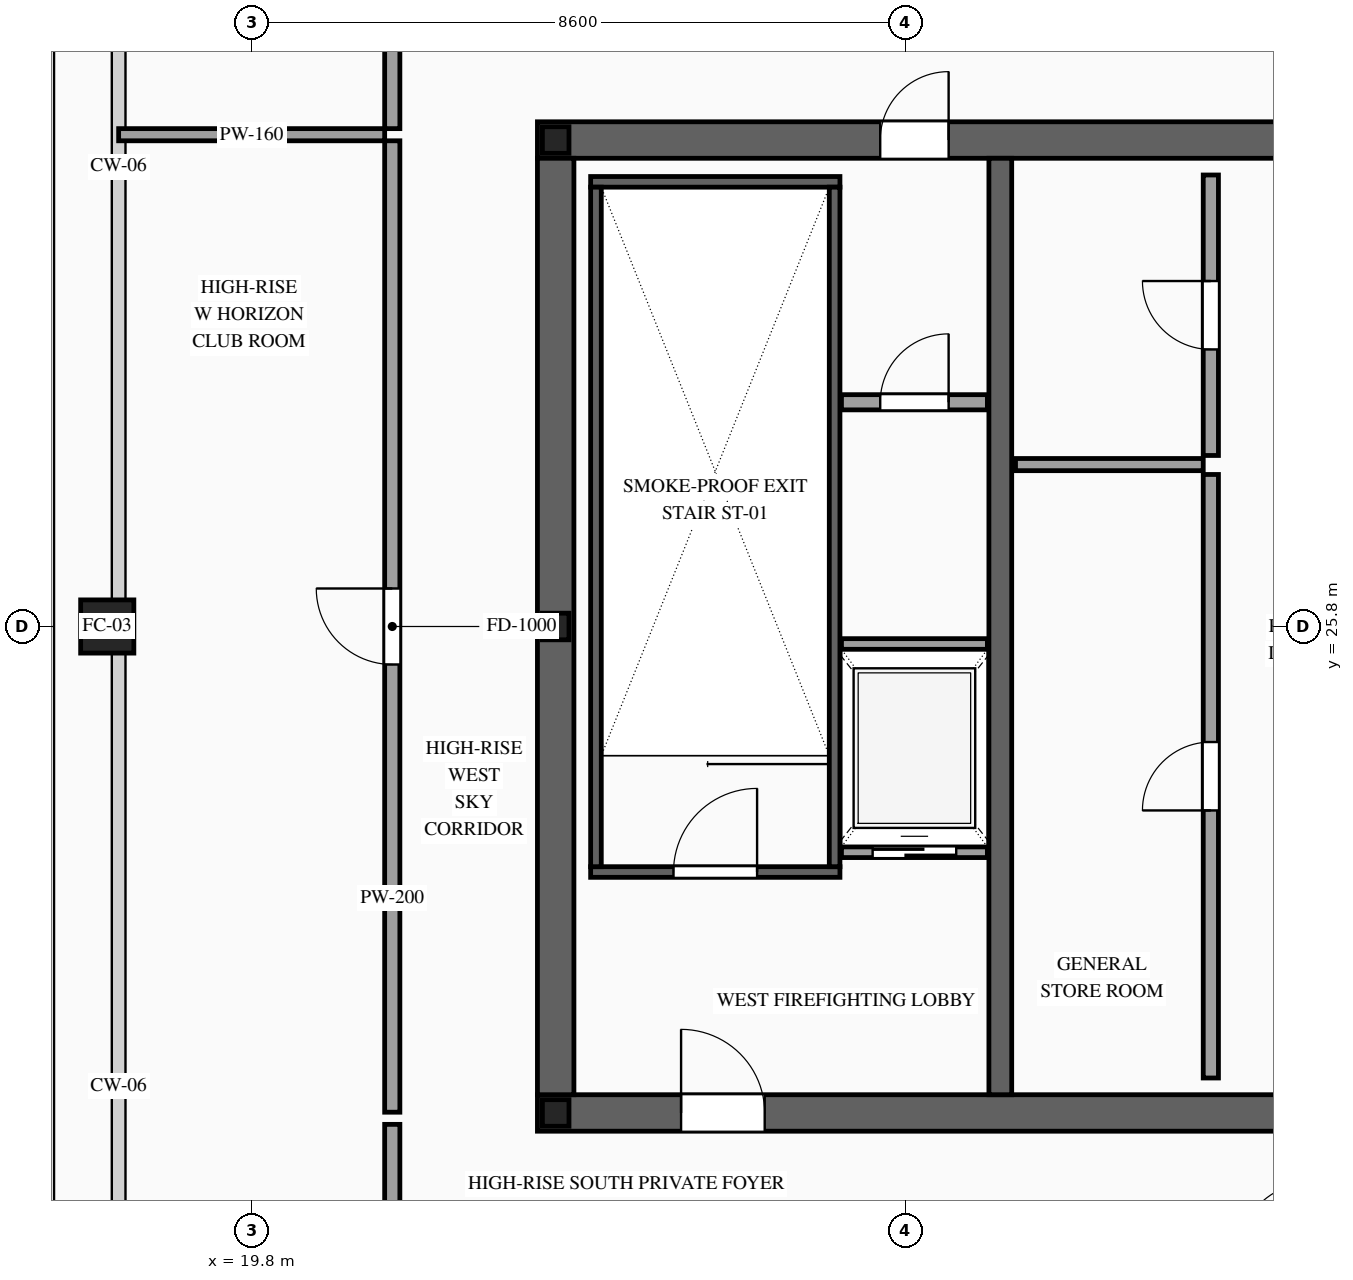
"""IFC4 building model, lengths in metres.
Left out: names, types, materials, properties, quantities, classifications, styles, units other than length and angle.
Written with IfcOpenShell. Run it as: python <this file> out.ifc"""

import sys

from ifc_helpers import new_model, si_unit, direction, frame, frame_2d, origin, origin_2d, place, context, subcontext, project, spatial, rectangle, hollow_rectangle, i_section, extrude, source, transform, mapped, element, fill, save


model = new_model("IFC4")
c1 = context("Model", 3, precision=1e-05, world=origin(), true_north=direction((0.0, 1.0)))
c2 = subcontext(c1, "Body", "Model", "MODEL_VIEW")
j1 = project(units=[si_unit("LENGTHUNIT", "METRE"), si_unit("PLANEANGLEUNIT", "RADIAN")], contexts=[c1])
p1 = place(None, origin())
s1 = spatial("IfcSite", under=j1, at=p1, CompositionType="ELEMENT")
p2 = place(p1, origin())
s2 = spatial("IfcBuilding", under=s1, at=p2, CompositionType="ELEMENT")
p3 = place(p2, frame((0.0, 0.0, 347.2)))
s3 = spatial("IfcBuildingStorey", under=s2, at=p3, CompositionType="ELEMENT", Elevation=347.2)
p4 = place(p3, frame((23.56, 19.4, 0.0), z_axis=(0.0, 0.0, 1.0), x_axis=(1.0, 0.0, 0.0)))
e1 = element("IfcWall", 1, at=p4, inside=s3, PredefinedType="SHEAR", context=c2, shape_type="SweptSolid", body=[
    extrude(rectangle(XDim=26.88, YDim=0.48, at=frame_2d((13.44, 0.0))), origin(), (0.0, 0.0, 1.0), 4.0),
])
p5 = place(p4, frame((1.89, 0.0, 0.0)))
e2 = element("IfcOpeningElement", 2, at=p5, cuts=e1, PredefinedType="OPENING", context=c2, shape_type="SweptSolid", body=[
    extrude(rectangle(XDim=1.1, YDim=2.2, at=frame_2d((0.55, 1.1))), frame((0.0, 0.255, 0.0), z_axis=(0.0, -1.0, 0.0), x_axis=(1.0, 0.0, 0.0)), (0.0, 0.0, 1.0), 0.51),
])
p6 = place(p4, frame((9.79, 0.0, 0.0)))
e3 = element("IfcOpeningElement", 3, at=p6, cuts=e1, PredefinedType="OPENING", context=c2, shape_type="SweptSolid", body=[
    extrude(rectangle(XDim=1.1, YDim=2.2, at=frame_2d((0.55, 1.1))), frame((0.0, 0.255, 0.0), z_axis=(0.0, -1.0, 0.0), x_axis=(1.0, 0.0, 0.0)), (0.0, 0.0, 1.0), 0.51),
])
p7 = place(p4, frame((22.99, 0.0, 0.0)))
e4 = element("IfcOpeningElement", 4, at=p7, cuts=e1, PredefinedType="OPENING", context=c2, shape_type="SweptSolid", body=[
    extrude(rectangle(XDim=1.1, YDim=2.2, at=frame_2d((0.55, 1.1))), frame((0.0, 0.255, 0.0), z_axis=(0.0, -1.0, 0.0), x_axis=(1.0, 0.0, 0.0)), (0.0, 0.0, 1.0), 0.51),
])
p8 = place(p4, frame((19.61, 0.0, 0.0)))
e5 = element("IfcOpeningElement", 5, at=p8, cuts=e1, PredefinedType="OPENING", context=c2, shape_type="SweptSolid", body=[
    extrude(rectangle(XDim=0.9, YDim=2.15, at=frame_2d((0.45, 1.075))), frame((0.0, 0.255, 0.0), z_axis=(0.0, -1.0, 0.0), x_axis=(1.0, 0.0, 0.0)), (0.0, 0.0, 1.0), 0.51),
])
p9 = place(p4, frame((18.17, 0.0, 0.0)))
e6 = element("IfcOpeningElement", 6, at=p9, cuts=e1, PredefinedType="OPENING", context=c2, shape_type="SweptSolid", body=[
    extrude(rectangle(XDim=0.9, YDim=2.15, at=frame_2d((0.45, 1.075))), frame((0.0, 0.255, 0.0), z_axis=(0.0, -1.0, 0.0), x_axis=(1.0, 0.0, 0.0)), (0.0, 0.0, 1.0), 0.51),
])
p10 = place(p3, frame((23.56, 32.2, 0.0), z_axis=(0.0, 0.0, 1.0), x_axis=(1.0, 0.0, 0.0)))
e7 = element("IfcWall", 7, at=p10, inside=s3, PredefinedType="SHEAR", context=c2, shape_type="SweptSolid", body=[
    extrude(rectangle(XDim=26.88, YDim=0.48, at=frame_2d((13.44, 0.0))), origin(), (0.0, 0.0, 1.0), 4.0),
])
p11 = place(p10, frame((4.51, 0.0, 0.0)))
e8 = element("IfcOpeningElement", 8, at=p11, cuts=e7, PredefinedType="OPENING", context=c2, shape_type="SweptSolid", body=[
    extrude(rectangle(XDim=0.9, YDim=2.15, at=frame_2d((0.45, 1.075))), frame((0.0, 0.255, 0.0), z_axis=(0.0, -1.0, 0.0), x_axis=(1.0, 0.0, 0.0)), (0.0, 0.0, 1.0), 0.51),
])
p12 = place(p10, frame((9.79, 0.0, 0.0)))
e9 = element("IfcOpeningElement", 9, at=p12, cuts=e7, PredefinedType="OPENING", context=c2, shape_type="SweptSolid", body=[
    extrude(rectangle(XDim=1.1, YDim=2.2, at=frame_2d((0.55, 1.1))), frame((0.0, 0.255, 0.0), z_axis=(0.0, -1.0, 0.0), x_axis=(1.0, 0.0, 0.0)), (0.0, 0.0, 1.0), 0.51),
])
p13 = place(p10, frame((15.64, 0.0, 0.0)))
e10 = element("IfcOpeningElement", 10, at=p13, cuts=e7, PredefinedType="OPENING", context=c2, shape_type="SweptSolid", body=[
    extrude(rectangle(XDim=1.1, YDim=2.2, at=frame_2d((0.55, 1.1))), frame((0.0, 0.255, 0.0), z_axis=(0.0, -1.0, 0.0), x_axis=(1.0, 0.0, 0.0)), (0.0, 0.0, 1.0), 0.51),
])
p14 = place(p10, frame((18.74, 0.0, 0.0)))
e11 = element("IfcOpeningElement", 11, at=p14, cuts=e7, PredefinedType="OPENING", context=c2, shape_type="SweptSolid", body=[
    extrude(rectangle(XDim=1.1, YDim=2.2, at=frame_2d((0.55, 1.1))), frame((0.0, 0.255, 0.0), z_axis=(0.0, -1.0, 0.0), x_axis=(1.0, 0.0, 0.0)), (0.0, 0.0, 1.0), 0.51),
])
m1 = source(origin(), c2, "Body", "SweptSolid", [
    extrude(rectangle(XDim=12.32, YDim=0.48, at=frame_2d((6.16, 0.0))), origin(), (0.0, 0.0, 1.0), 4.0),
])
p15 = place(p3, frame((23.8, 19.64, 0.0), z_axis=(0.0, 0.0, 1.0), x_axis=(0.0, 1.0, 0.0)))
e12 = element("IfcWall", 12, at=p15, inside=s3, PredefinedType="SHEAR", context=c2, shape_type="MappedRepresentation", body=[
    mapped(m1, transform((0.0, 0.0, 0.0), scale=1.0)),
])
m2 = source(origin(), c2, "Body", "SweptSolid", [
    extrude(rectangle(XDim=12.32, YDim=0.3, at=frame_2d((6.16, 0.0))), origin(), (0.0, 0.0, 1.0), 4.0),
])
p16 = place(p3, frame((29.65, 19.64, 0.0), z_axis=(0.0, 0.0, 1.0), x_axis=(0.0, 1.0, 0.0)))
e13 = element("IfcWall", 13, at=p16, inside=s3, PredefinedType="SOLIDWALL", context=c2, shape_type="MappedRepresentation", body=[
    mapped(m2, transform((0.0, 0.0, 0.0), scale=1.0)),
])
m3 = source(origin(), c2, "Body", "SweptSolid", [
    extrude(i_section(OverallWidth=0.35, OverallDepth=0.35, WebThickness=0.012, FlangeThickness=0.019, at=origin_2d()), origin(), (0.0, 0.0, 1.0), 4.0),
])
for number, where, z_axis, x_axis in (
    (14, (23.8, 19.4, 0.0), (0.0, 0.0, 1.0), (1.0, 0.0, 0.0)),
    (15, (23.8, 25.8, 0.0), (0.0, 0.0, 1.0), (1.0, 0.0, 0.0)),
    (16, (23.8, 32.2, 0.0), (0.0, 0.0, 1.0), (1.0, 0.0, 0.0)),
):
    element("IfcColumn", number, at=place(p3, frame(where, z_axis=z_axis, x_axis=x_axis)), inside=s3, PredefinedType="COLUMN", context=c2, shape_type="MappedRepresentation", body=[
        mapped(m3, transform((0.0, 0.0, 0.0), scale=1.0)),
    ])
m4 = source(origin(), c2, "Body", "SweptSolid", [
    extrude(hollow_rectangle(XDim=0.7, YDim=0.7, WallThickness=0.032, at=origin_2d()), origin(), (0.0, 0.0, 1.0), 4.0),
])
p17 = place(p3, frame((17.9, 25.8, 0.0), z_axis=(0.0, 0.0, 1.0), x_axis=(1.0, 0.0, 0.0)))
e17 = element("IfcColumn", 17, at=p17, inside=s3, PredefinedType="COLUMN", context=c2, shape_type="MappedRepresentation", body=[
    mapped(m4, transform((0.0, 0.0, 0.0), scale=1.0)),
])
p18 = place(p3, frame((27.56, 22.83, 0.0), z_axis=(0.0, 0.0, 1.0), x_axis=(1.0, 0.0, 0.0)))
e18 = element("IfcWall", 18, at=p18, inside=s3, PredefinedType="SOLIDWALL", context=c2, shape_type="SweptSolid", body=[
    extrude(rectangle(XDim=1.92, YDim=0.14, at=frame_2d((0.96, 0.0))), origin(), (0.0, 0.0, 1.0), 3.7),
])
p19 = place(p18, frame((0.41, 0.0, 0.0)))
e19 = element("IfcOpeningElement", 19, at=p19, cuts=e18, PredefinedType="OPENING", context=c2, shape_type="SweptSolid", body=[
    extrude(rectangle(XDim=1.1, YDim=2.2, at=frame_2d((0.55, 1.1))), frame((0.0, 0.085, 0.0), z_axis=(0.0, -1.0, 0.0), x_axis=(1.0, 0.0, 0.0)), (0.0, 0.0, 1.0), 0.17),
])
m5 = source(origin(), c2, "Body", "SweptSolid", [
    extrude(rectangle(XDim=1.92, YDim=0.14, at=frame_2d((0.96, 0.0))), origin(), (0.0, 0.0, 1.0), 3.7),
])
p20 = place(p3, frame((27.56, 25.57, 0.0), z_axis=(0.0, 0.0, 1.0), x_axis=(1.0, 0.0, 0.0)))
e20 = element("IfcWall", 20, at=p20, inside=s3, PredefinedType="SOLIDWALL", context=c2, shape_type="MappedRepresentation", body=[
    mapped(m5, transform((0.0, 0.0, 0.0), scale=1.0)),
])
p21 = place(p3, frame((24.26, 22.57, 0.0), z_axis=(0.0, 0.0, 1.0), x_axis=(1.0, 0.0, 0.0)))
e21 = element("IfcWall", 21, at=p21, inside=s3, PredefinedType="SOLIDWALL", context=c2, shape_type="SweptSolid", body=[
    extrude(rectangle(XDim=3.28, YDim=0.14, at=frame_2d((1.64, 0.0))), origin(), (0.0, 0.0, 1.0), 3.7),
])
p22 = place(p21, frame((1.09, 0.0, 0.0)))
e22 = element("IfcOpeningElement", 22, at=p22, cuts=e21, PredefinedType="OPENING", context=c2, shape_type="SweptSolid", body=[
    extrude(rectangle(XDim=1.1, YDim=2.2, at=frame_2d((0.55, 1.1))), frame((0.0, 0.085, 0.0), z_axis=(0.0, -1.0, 0.0), x_axis=(1.0, 0.0, 0.0)), (0.0, 0.0, 1.0), 0.17),
])
m6 = source(origin(), c2, "Body", "SweptSolid", [
    extrude(rectangle(XDim=3.28, YDim=0.14, at=frame_2d((1.64, 0.0))), origin(), (0.0, 0.0, 1.0), 3.7),
])
p23 = place(p3, frame((24.26, 31.65, 0.0), z_axis=(0.0, 0.0, 1.0), x_axis=(1.0, 0.0, 0.0)))
e23 = element("IfcWall", 23, at=p23, inside=s3, PredefinedType="SOLIDWALL", context=c2, shape_type="MappedRepresentation", body=[
    mapped(m6, transform((0.0, 0.0, 0.0), scale=1.0)),
])
m7 = source(origin(), c2, "Body", "SweptSolid", [
    extrude(rectangle(XDim=8.94, YDim=0.14, at=frame_2d((4.47, 0.0))), origin(), (0.0, 0.0, 1.0), 3.7),
])
for number, where, z_axis, x_axis in (
    (24, (24.33, 22.64, 0.0), (0.0, 0.0, 1.0), (0.0, 1.0, 0.0)),
    (25, (27.47, 22.64, 0.0), (0.0, 0.0, 1.0), (0.0, 1.0, 0.0)),
):
    element("IfcWall", number, at=place(p3, frame(where, z_axis=z_axis, x_axis=x_axis)), inside=s3, PredefinedType="SOLIDWALL", context=c2, shape_type="MappedRepresentation", body=[
        mapped(m7, transform((0.0, 0.0, 0.0), scale=1.0)),
    ])
p24 = place(p3, frame((27.56, 28.75, 0.0), z_axis=(0.0, 0.0, 1.0), x_axis=(1.0, 0.0, 0.0)))
e26 = element("IfcWall", 26, at=p24, inside=s3, PredefinedType="PARTITIONING", context=c2, shape_type="SweptSolid", body=[
    extrude(rectangle(XDim=1.92, YDim=0.2, at=frame_2d((0.96, 0.0))), origin(), (0.0, 0.0, 1.0), 3.7),
])
p25 = place(p24, frame((0.51, 0.0, 0.0)))
e27 = element("IfcOpeningElement", 27, at=p25, cuts=e26, PredefinedType="OPENING", context=c2, shape_type="SweptSolid", body=[
    extrude(rectangle(XDim=0.9, YDim=2.15, at=frame_2d((0.45, 1.075))), frame((0.0, 0.115, 0.0), z_axis=(0.0, -1.0, 0.0), x_axis=(1.0, 0.0, 0.0)), (0.0, 0.0, 1.0), 0.23),
])
p26 = place(p3, frame((32.42, 19.86, 0.0), z_axis=(0.0, 0.0, 1.0), x_axis=(0.0, 1.0, 0.0)))
e28 = element("IfcWall", 28, at=p26, inside=s3, PredefinedType="PARTITIONING", context=c2, shape_type="SweptSolid", body=[
    extrude(rectangle(XDim=7.94, YDim=0.2, at=frame_2d((3.97, 0.0))), origin(), (0.0, 0.0, 1.0), 3.7),
])
p27 = place(p26, frame((3.52, 0.0, 0.0)))
e29 = element("IfcOpeningElement", 29, at=p27, cuts=e28, PredefinedType="OPENING", context=c2, shape_type="SweptSolid", body=[
    extrude(rectangle(XDim=0.9, YDim=2.15, at=frame_2d((0.45, 1.075))), frame((0.0, 0.115, 0.0), z_axis=(0.0, -1.0, 0.0), x_axis=(1.0, 0.0, 0.0)), (0.0, 0.0, 1.0), 0.23),
])
p28 = place(p3, frame((32.42, 28.05, 0.0), z_axis=(0.0, 0.0, 1.0), x_axis=(0.0, 1.0, 0.0)))
e30 = element("IfcWall", 30, at=p28, inside=s3, PredefinedType="PARTITIONING", context=c2, shape_type="SweptSolid", body=[
    extrude(rectangle(XDim=3.69, YDim=0.2, at=frame_2d((1.845, 0.0))), origin(), (0.0, 0.0, 1.0), 3.7),
])
p29 = place(p28, frame((1.395, 0.0, 0.0)))
e31 = element("IfcOpeningElement", 31, at=p29, cuts=e30, PredefinedType="OPENING", context=c2, shape_type="SweptSolid", body=[
    extrude(rectangle(XDim=0.9, YDim=2.15, at=frame_2d((0.45, 1.075))), frame((0.0, 0.115, 0.0), z_axis=(0.0, -1.0, 0.0), x_axis=(1.0, 0.0, 0.0)), (0.0, 0.0, 1.0), 0.23),
])
m8 = source(origin(), c2, "Body", "SweptSolid", [
    extrude(rectangle(XDim=2.47, YDim=0.16, at=frame_2d((1.235, 0.0))), origin(), (0.0, 0.0, 1.0), 3.7),
])
p30 = place(p3, frame((29.85, 27.93, 0.0), z_axis=(0.0, 0.0, 1.0), x_axis=(1.0, 0.0, 0.0)))
e32 = element("IfcWall", 32, at=p30, inside=s3, PredefinedType="PARTITIONING", context=c2, shape_type="MappedRepresentation", body=[
    mapped(m8, transform((0.0, 0.0, 0.0), scale=1.0)),
])
m9 = source(origin(), c2, "Body", "SweptSolid", [
    extrude(rectangle(XDim=1.7, YDim=0.2, at=frame_2d((0.85, 0.0))), origin(), (0.0, 0.0, 1.0), 3.7),
])
for number, where, z_axis, x_axis in (
    (33, (21.65, 32.35, 0.0), (0.0, 0.0, 1.0), (0.0, 1.0, 0.0)),
    (34, (21.65, 17.55, 0.0), (0.0, 0.0, 1.0), (0.0, 1.0, 0.0)),
):
    element("IfcWall", number, at=place(p3, frame(where, z_axis=z_axis, x_axis=x_axis)), inside=s3, PredefinedType="PARTITIONING", context=c2, shape_type="MappedRepresentation", body=[
        mapped(m9, transform((0.0, 0.0, 0.0), scale=1.0)),
    ])
p31 = place(p3, frame((21.65, 19.41, 0.0), z_axis=(0.0, 0.0, 1.0), x_axis=(0.0, 1.0, 0.0)))
e35 = element("IfcWall", 35, at=p31, inside=s3, PredefinedType="PARTITIONING", context=c2, shape_type="SweptSolid", body=[
    extrude(rectangle(XDim=12.78, YDim=0.2, at=frame_2d((6.39, 0.0))), origin(), (0.0, 0.0, 1.0), 3.7),
])
p32 = place(p31, frame((5.89, 0.0, 0.0)))
e36 = element("IfcOpeningElement", 36, at=p32, cuts=e35, PredefinedType="OPENING", context=c2, shape_type="SweptSolid", body=[
    extrude(rectangle(XDim=1.0, YDim=2.2, at=frame_2d((0.5, 1.1))), frame((0.0, 0.115, 0.0), z_axis=(0.0, -1.0, 0.0), x_axis=(1.0, 0.0, 0.0)), (0.0, 0.0, 1.0), 0.23),
])
m10 = source(origin(), c2, "Body", "SweptSolid", [
    extrude(rectangle(XDim=3.5, YDim=0.16, at=frame_2d((1.75, 0.0))), origin(), (0.0, 0.0, 1.0), 3.245),
])
p33 = place(p3, frame((18.05, 32.27, 0.0), z_axis=(0.0, 0.0, 1.0), x_axis=(1.0, 0.0, 0.0)))
e37 = element("IfcWall", 37, at=p33, inside=s3, PredefinedType="PARTITIONING", context=c2, shape_type="MappedRepresentation", body=[
    mapped(m10, transform((0.0, 0.0, 0.0), scale=1.0)),
])
m11 = source(origin(), c2, "Body", "SweptSolid", [
    extrude(rectangle(XDim=1.1, YDim=2.2, at=frame_2d((0.55, 1.1))), frame((0.0, 0.025, 0.0), z_axis=(0.0, -1.0, 0.0), x_axis=(1.0, 0.0, 0.0)), (0.0, 0.0, 1.0), 0.05),
])
p34 = place(p19, origin())
e38 = element("IfcDoor", 38, at=p34, inside=s3, OperationType="SLIDING_TO_LEFT", PredefinedType="DOOR", context=c2, shape_type="MappedRepresentation", body=[
    mapped(m11, transform((0.0, 0.0, 0.0), scale=1.0)),
])
fill(e19, e38)
m12 = source(origin(), c2, "Body", "SweptSolid", [
    extrude(rectangle(XDim=1.1, YDim=2.2, at=frame_2d((0.55, 1.1))), frame((0.0, 0.025, 0.0), z_axis=(0.0, -1.0, 0.0), x_axis=(1.0, 0.0, 0.0)), (0.0, 0.0, 1.0), 0.05),
])
p35 = place(p22, origin())
e39 = element("IfcDoor", 39, at=p35, inside=s3, OperationType="SINGLE_SWING_RIGHT", PredefinedType="DOOR", context=c2, shape_type="MappedRepresentation", body=[
    mapped(m12, transform((0.0, 0.0, 0.0), scale=1.0)),
])
fill(e22, e39)
p36 = place(p5, origin())
e40 = element("IfcDoor", 40, at=p36, inside=s3, OperationType="SINGLE_SWING_LEFT", PredefinedType="DOOR", context=c2, shape_type="MappedRepresentation", body=[
    mapped(m12, transform((0.0, 0.0, 0.0), scale=1.0)),
])
fill(e2, e40)
m13 = source(origin(), c2, "Body", "SweptSolid", [
    extrude(rectangle(XDim=0.9, YDim=2.15, at=frame_2d((0.45, 1.075))), frame((0.0, 0.025, 0.0), z_axis=(0.0, -1.0, 0.0), x_axis=(1.0, 0.0, 0.0)), (0.0, 0.0, 1.0), 0.05),
])
p37 = place(p11, origin())
e41 = element("IfcDoor", 41, at=p37, inside=s3, OperationType="SINGLE_SWING_RIGHT", PredefinedType="DOOR", context=c2, shape_type="MappedRepresentation", body=[
    mapped(m13, transform((0.0, 0.0, 0.0), scale=1.0)),
])
fill(e8, e41)
p38 = place(p25, origin())
e42 = element("IfcDoor", 42, at=p38, inside=s3, OperationType="SINGLE_SWING_RIGHT", PredefinedType="DOOR", context=c2, shape_type="MappedRepresentation", body=[
    mapped(m13, transform((0.0, 0.0, 0.0), scale=1.0)),
])
fill(e27, e42)
p39 = place(p27, origin())
e43 = element("IfcDoor", 43, at=p39, inside=s3, OperationType="SINGLE_SWING_LEFT", PredefinedType="DOOR", context=c2, shape_type="MappedRepresentation", body=[
    mapped(m13, transform((0.0, 0.0, 0.0), scale=1.0)),
])
fill(e29, e43)
p40 = place(p29, origin())
e44 = element("IfcDoor", 44, at=p40, inside=s3, OperationType="SINGLE_SWING_RIGHT", PredefinedType="DOOR", context=c2, shape_type="MappedRepresentation", body=[
    mapped(m13, transform((0.0, 0.0, 0.0), scale=1.0)),
])
fill(e31, e44)
m14 = source(origin(), c2, "Body", "SweptSolid", [
    extrude(rectangle(XDim=1.0, YDim=2.2, at=frame_2d((0.5, 1.1))), frame((0.0, 0.025, 0.0), z_axis=(0.0, -1.0, 0.0), x_axis=(1.0, 0.0, 0.0)), (0.0, 0.0, 1.0), 0.05),
])
p41 = place(p32, origin())
e45 = element("IfcDoor", 45, at=p41, inside=s3, OperationType="SINGLE_SWING_RIGHT", PredefinedType="DOOR", context=c2, shape_type="MappedRepresentation", body=[
    mapped(m14, transform((0.0, 0.0, 0.0), scale=1.0)),
])
fill(e36, e45)
save(model, sys.argv[1])
